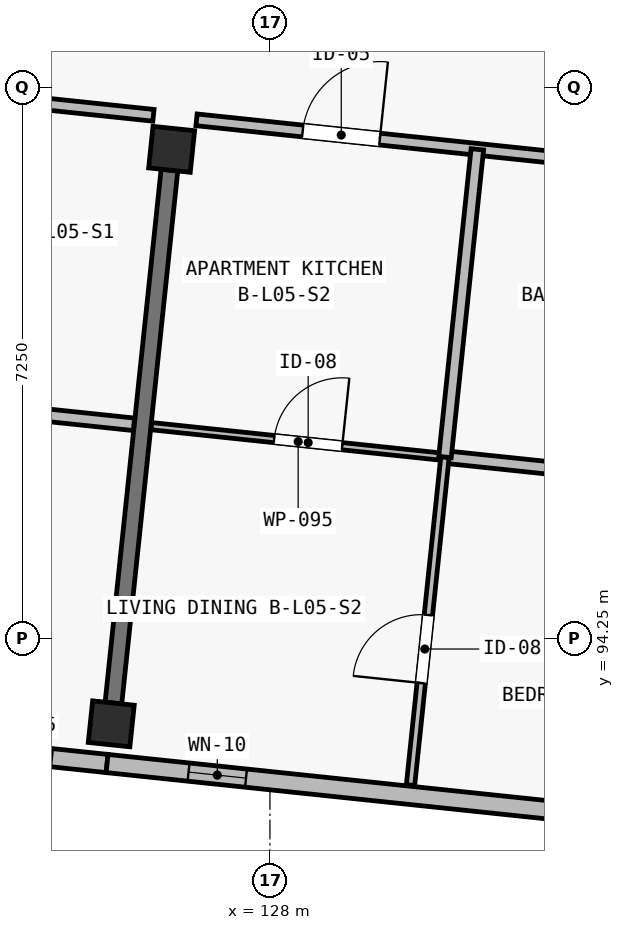
"""IFC4 building model, lengths in metres.
Left out: names, types, materials, properties, quantities, classifications, styles, units other than length and angle.
Written with IfcOpenShell. Run it as: python <this file> out.ifc"""

import sys

from ifc_helpers import new_model, si_unit, direction, frame, frame_2d, origin, origin_2d, place, context, subcontext, project, spatial, rectangle, extrude, element, fill, save


model = new_model("IFC4")
c1 = context("Model", 3, precision=1e-05, world=origin(), true_north=direction((0.0, 1.0)))
c2 = subcontext(c1, "Body", "Model", "MODEL_VIEW")
j1 = project(units=[si_unit("LENGTHUNIT", "METRE"), si_unit("PLANEANGLEUNIT", "RADIAN")], contexts=[c1])
p1 = place(None, origin())
s1 = spatial("IfcSite", under=j1, at=p1, CompositionType="ELEMENT")
p2 = place(p1, origin())
s2 = spatial("IfcBuilding", under=s1, at=p2, CompositionType="ELEMENT")
p3 = place(p2, frame((0.0, 0.0, 18.15)))
s3 = spatial("IfcBuildingStorey", under=s2, at=p3, CompositionType="ELEMENT", Elevation=18.15)
for number, where, z_axis, x_axis in (
    (1, (125.912, 93.127, 0.0), (0.0, 0.0, 1.0), (0.995, -0.105, 0.0)),
    (2, (126.707, 100.686, 0.0), (0.0, 0.0, 1.0), (0.995, -0.105, 0.0)),
):
    element("IfcColumn", number, at=place(p3, frame(where, z_axis=z_axis, x_axis=x_axis)), inside=s3, PredefinedType="COLUMN", context=c2, shape_type="SweptSolid", body=[
        extrude(rectangle(XDim=0.55, YDim=0.55, at=origin_2d()), origin(), (0.0, 0.0, 1.0), 3.25),
    ])
p4 = place(p3, frame((125.941, 93.401, 0.0), z_axis=(0.0, 0.0, 1.0), x_axis=(0.104515329964, 0.994523275646, 0.0)))
e3 = element("IfcWall", 3, at=p4, inside=s3, PredefinedType="SHEAR", context=c2, shape_type="SweptSolid", body=[
    extrude(rectangle(XDim=7.05, YDim=0.22, at=frame_2d((3.525, 0.0))), origin(), (0.0, 0.0, 1.0), 2.5),
])
p5 = place(p3, frame((125.857, 92.605, 0.0), z_axis=(0.0, 0.0, 1.0), x_axis=(-0.994522329422, 0.104524333444, 0.0)))
e4 = element("IfcWall", 4, at=p5, inside=s3, PredefinedType="SOLIDWALL", context=c2, shape_type="SweptSolid", body=[
    extrude(rectangle(XDim=8.0, YDim=0.24, at=frame_2d((4.0, 0.0))), origin(), (0.0, 0.0, 1.0), 3.0),
])
p6 = place(p5, frame((5.345, 0.0, 0.0)))
e5 = element("IfcOpeningElement", 5, at=p6, cuts=e4, PredefinedType="OPENING", context=c2, shape_type="SweptSolid", body=[
    extrude(rectangle(XDim=1.8, YDim=2.12, at=frame_2d((0.9, 1.06))), frame((0.0, 0.135, 0.0), z_axis=(0.0, -1.0, 0.0), x_axis=(1.0, 0.0, 0.0)), (0.0, 0.0, 1.0), 0.27),
])
p7 = place(p5, frame((0.73, 0.0, 0.42)))
e6 = element("IfcOpeningElement", 6, at=p7, cuts=e4, PredefinedType="OPENING", context=c2, shape_type="SweptSolid", body=[
    extrude(rectangle(XDim=0.66, YDim=2.32, at=frame_2d((0.33, 1.16))), frame((0.0, 0.135, 0.0), z_axis=(0.0, -1.0, 0.0), x_axis=(1.0, 0.0, 0.0)), (0.0, 0.0, 1.0), 0.27),
])
p8 = place(p3, frame((133.814, 91.769, 0.0), z_axis=(0.0, 0.0, 1.0), x_axis=(-0.994522662826, 0.104521161134, 0.0)))
e7 = element("IfcWall", 7, at=p8, inside=s3, PredefinedType="SOLIDWALL", context=c2, shape_type="SweptSolid", body=[
    extrude(rectangle(XDim=8.0, YDim=0.24, at=frame_2d((4.0, 0.0))), origin(), (0.0, 0.0, 1.0), 3.0),
])
p9 = place(p8, frame((1.268, 0.0, 0.48)))
e8 = element("IfcOpeningElement", 8, at=p9, cuts=e7, PredefinedType="OPENING", context=c2, shape_type="SweptSolid", body=[
    extrude(rectangle(XDim=0.7, YDim=2.36, at=frame_2d((0.35, 1.18))), frame((0.0, 0.135, 0.0), z_axis=(0.0, -1.0, 0.0), x_axis=(1.0, 0.0, 0.0)), (0.0, 0.0, 1.0), 0.27),
])
p10 = place(p8, frame((6.162, 0.0, 0.48)))
e9 = element("IfcOpeningElement", 9, at=p10, cuts=e7, PredefinedType="OPENING", context=c2, shape_type="SweptSolid", body=[
    extrude(rectangle(XDim=0.76, YDim=2.34, at=frame_2d((0.38, 1.17))), frame((0.0, 0.135, 0.0), z_axis=(0.0, -1.0, 0.0), x_axis=(1.0, 0.0, 0.0)), (0.0, 0.0, 1.0), 0.27),
])
p11 = place(p3, frame((119.078, 101.91, 0.0), z_axis=(0.0, 0.0, 1.0), x_axis=(0.99451912784, -0.104554791185, 0.0)))
e10 = element("IfcWall", 10, at=p11, inside=s3, PredefinedType="PARTITIONING", context=c2, shape_type="SweptSolid", body=[
    extrude(rectangle(XDim=7.43, YDim=0.155, at=frame_2d((3.715, 0.0))), origin(), (0.0, 0.0, 1.0), 2.97),
])
p12 = place(p11, frame((1.405, 0.0, 0.0)))
e11 = element("IfcOpeningElement", 11, at=p12, cuts=e10, PredefinedType="OPENING", context=c2, shape_type="SweptSolid", body=[
    extrude(rectangle(XDim=0.98, YDim=2.15, at=frame_2d((0.49, 1.075))), frame((0.0, 0.093, 0.0), z_axis=(0.0, -1.0, 0.0), x_axis=(1.0, 0.0, 0.0)), (0.0, 0.0, 1.0), 0.185),
])
p13 = place(p3, frame((122.347, 97.474, 0.0), z_axis=(0.0, 0.0, 1.0), x_axis=(0.994517841934, -0.104567021925, 0.0)))
e12 = element("IfcWall", 12, at=p13, inside=s3, PredefinedType="PLUMBINGWALL", context=c2, shape_type="SweptSolid", body=[
    extrude(rectangle(XDim=3.885, YDim=0.165, at=frame_2d((1.942, 0.0))), origin(), (0.0, 0.0, 1.0), 2.97),
])
p14 = place(p13, frame((1.4, 0.0, 0.0)))
e13 = element("IfcOpeningElement", 13, at=p14, cuts=e12, PredefinedType="OPENING", context=c2, shape_type="SweptSolid", body=[
    extrude(rectangle(XDim=0.82, YDim=2.08, at=frame_2d((0.41, 1.04))), frame((0.0, 0.097, 0.0), z_axis=(0.0, -1.0, 0.0), x_axis=(1.0, 0.0, 0.0)), (0.0, 0.0, 1.0), 0.195),
])
p15 = place(p3, frame((127.034, 101.074, 0.0), z_axis=(0.0, 0.0, 1.0), x_axis=(0.994522184982, -0.104525707739, 0.0)))
e14 = element("IfcWall", 14, at=p15, inside=s3, PredefinedType="PARTITIONING", context=c2, shape_type="SweptSolid", body=[
    extrude(rectangle(XDim=7.43, YDim=0.155, at=frame_2d((3.715, 0.0))), origin(), (0.0, 0.0, 1.0), 2.97),
])
p16 = place(p15, frame((1.405, 0.0, 0.0)))
e15 = element("IfcOpeningElement", 15, at=p16, cuts=e14, PredefinedType="OPENING", context=c2, shape_type="SweptSolid", body=[
    extrude(rectangle(XDim=1.02, YDim=2.2, at=frame_2d((0.51, 1.1))), frame((0.0, 0.093, 0.0), z_axis=(0.0, -1.0, 0.0), x_axis=(1.0, 0.0, 0.0)), (0.0, 0.0, 1.0), 0.185),
])
p17 = place(p3, frame((126.44, 97.044, 0.0), z_axis=(0.0, 0.0, 1.0), x_axis=(0.994517154753, -0.104573557378, 0.0)))
e16 = element("IfcWall", 16, at=p17, inside=s3, PredefinedType="PARTITIONING", context=c2, shape_type="SweptSolid", body=[
    extrude(rectangle(XDim=3.885, YDim=0.095, at=frame_2d((1.942, 0.0))), origin(), (0.0, 0.0, 1.0), 2.97),
])
p18 = place(p17, frame((1.625, 0.0, 0.0)))
e17 = element("IfcOpeningElement", 17, at=p18, cuts=e16, PredefinedType="OPENING", context=c2, shape_type="SweptSolid", body=[
    extrude(rectangle(XDim=0.9, YDim=2.1, at=frame_2d((0.45, 1.05))), frame((0.0, 0.062, 0.0), z_axis=(0.0, -1.0, 0.0), x_axis=(1.0, 0.0, 0.0)), (0.0, 0.0, 1.0), 0.125),
])
p19 = place(p3, frame((130.303, 96.638, 0.0), z_axis=(0.0, 0.0, 1.0), x_axis=(0.994524375082, -0.104504867671, 0.0)))
e18 = element("IfcWall", 18, at=p19, inside=s3, PredefinedType="PLUMBINGWALL", context=c2, shape_type="SweptSolid", body=[
    extrude(rectangle(XDim=3.885, YDim=0.165, at=frame_2d((1.942, 0.0))), origin(), (0.0, 0.0, 1.0), 2.97),
])
p20 = place(p19, frame((1.4, 0.0, 0.0)))
e19 = element("IfcOpeningElement", 19, at=p20, cuts=e18, PredefinedType="OPENING", context=c2, shape_type="SweptSolid", body=[
    extrude(rectangle(XDim=0.82, YDim=2.08, at=frame_2d((0.41, 1.04))), frame((0.0, 0.097, 0.0), z_axis=(0.0, -1.0, 0.0), x_axis=(1.0, 0.0, 0.0)), (0.0, 0.0, 1.0), 0.195),
])
p21 = place(p3, frame((129.85, 92.322, 0.0), z_axis=(0.0, 0.0, 1.0), x_axis=(0.104520797474, 0.994522701046, 0.0)))
e20 = element("IfcWall", 20, at=p21, inside=s3, PredefinedType="PARTITIONING", context=c2, shape_type="SweptSolid", body=[
    extrude(rectangle(XDim=4.34, YDim=0.11, at=frame_2d((2.17, 0.0))), origin(), (0.0, 0.0, 1.0), 2.97),
])
p22 = place(p21, frame((1.35, 0.0, 0.0)))
e21 = element("IfcOpeningElement", 21, at=p22, cuts=e20, PredefinedType="OPENING", context=c2, shape_type="SweptSolid", body=[
    extrude(rectangle(XDim=0.9, YDim=2.1, at=frame_2d((0.45, 1.05))), frame((0.0, 0.07, 0.0), z_axis=(0.0, -1.0, 0.0), x_axis=(1.0, 0.0, 0.0)), (0.0, 0.0, 1.0), 0.14),
])
p23 = place(p3, frame((130.303, 96.638, 0.0), z_axis=(0.0, 0.0, 1.0), x_axis=(0.104550520052, 0.99451957686, 0.0)))
e22 = element("IfcWall", 22, at=p23, inside=s3, PredefinedType="PLUMBINGWALL", context=c2, shape_type="SweptSolid", body=[
    extrude(rectangle(XDim=4.07, YDim=0.165, at=frame_2d((2.035, 0.0))), origin(), (0.0, 0.0, 1.0), 2.97),
])
p24 = place(p7, origin())
e23 = element("IfcWindow", 23, at=p24, inside=s3, PartitioningType="SINGLE_PANEL", PredefinedType="WINDOW", context=c2, shape_type="SweptSolid", body=[
    extrude(rectangle(XDim=0.66, YDim=2.32, at=frame_2d((0.33, 1.16))), frame((0.0, 0.03, 0.0), z_axis=(0.0, -1.0, 0.0), x_axis=(1.0, 0.0, 0.0)), (0.0, 0.0, 1.0), 0.06),
])
fill(e6, e23)
p25 = place(p10, origin())
e24 = element("IfcWindow", 24, at=p25, inside=s3, PartitioningType="SINGLE_PANEL", PredefinedType="WINDOW", context=c2, shape_type="SweptSolid", body=[
    extrude(rectangle(XDim=0.76, YDim=2.34, at=frame_2d((0.38, 1.17))), frame((0.0, 0.03, 0.0), z_axis=(0.0, -1.0, 0.0), x_axis=(1.0, 0.0, 0.0)), (0.0, 0.0, 1.0), 0.06),
])
fill(e9, e24)
p26 = place(p16, origin())
e25 = element("IfcDoor", 25, at=p26, inside=s3, OperationType="SINGLE_SWING_RIGHT", PredefinedType="DOOR", context=c2, shape_type="SweptSolid", body=[
    extrude(rectangle(XDim=1.02, YDim=2.2, at=frame_2d((0.51, 1.1))), frame((0.0, 0.025, 0.0), z_axis=(0.0, -1.0, 0.0), x_axis=(1.0, 0.0, 0.0)), (0.0, 0.0, 1.0), 0.05),
])
fill(e15, e25)
p27 = place(p18, origin())
e26 = element("IfcDoor", 26, at=p27, inside=s3, OperationType="SINGLE_SWING_RIGHT", PredefinedType="DOOR", context=c2, shape_type="SweptSolid", body=[
    extrude(rectangle(XDim=0.9, YDim=2.1, at=frame_2d((0.45, 1.05))), frame((0.0, 0.025, 0.0), z_axis=(0.0, -1.0, 0.0), x_axis=(1.0, 0.0, 0.0)), (0.0, 0.0, 1.0), 0.05),
])
fill(e17, e26)
p28 = place(p22, origin())
e27 = element("IfcDoor", 27, at=p28, inside=s3, OperationType="SINGLE_SWING_LEFT", PredefinedType="DOOR", context=c2, shape_type="SweptSolid", body=[
    extrude(rectangle(XDim=0.9, YDim=2.1, at=frame_2d((0.45, 1.05))), frame((0.0, 0.025, 0.0), z_axis=(0.0, -1.0, 0.0), x_axis=(1.0, 0.0, 0.0)), (0.0, 0.0, 1.0), 0.05),
])
fill(e21, e27)
save(model, sys.argv[1])
